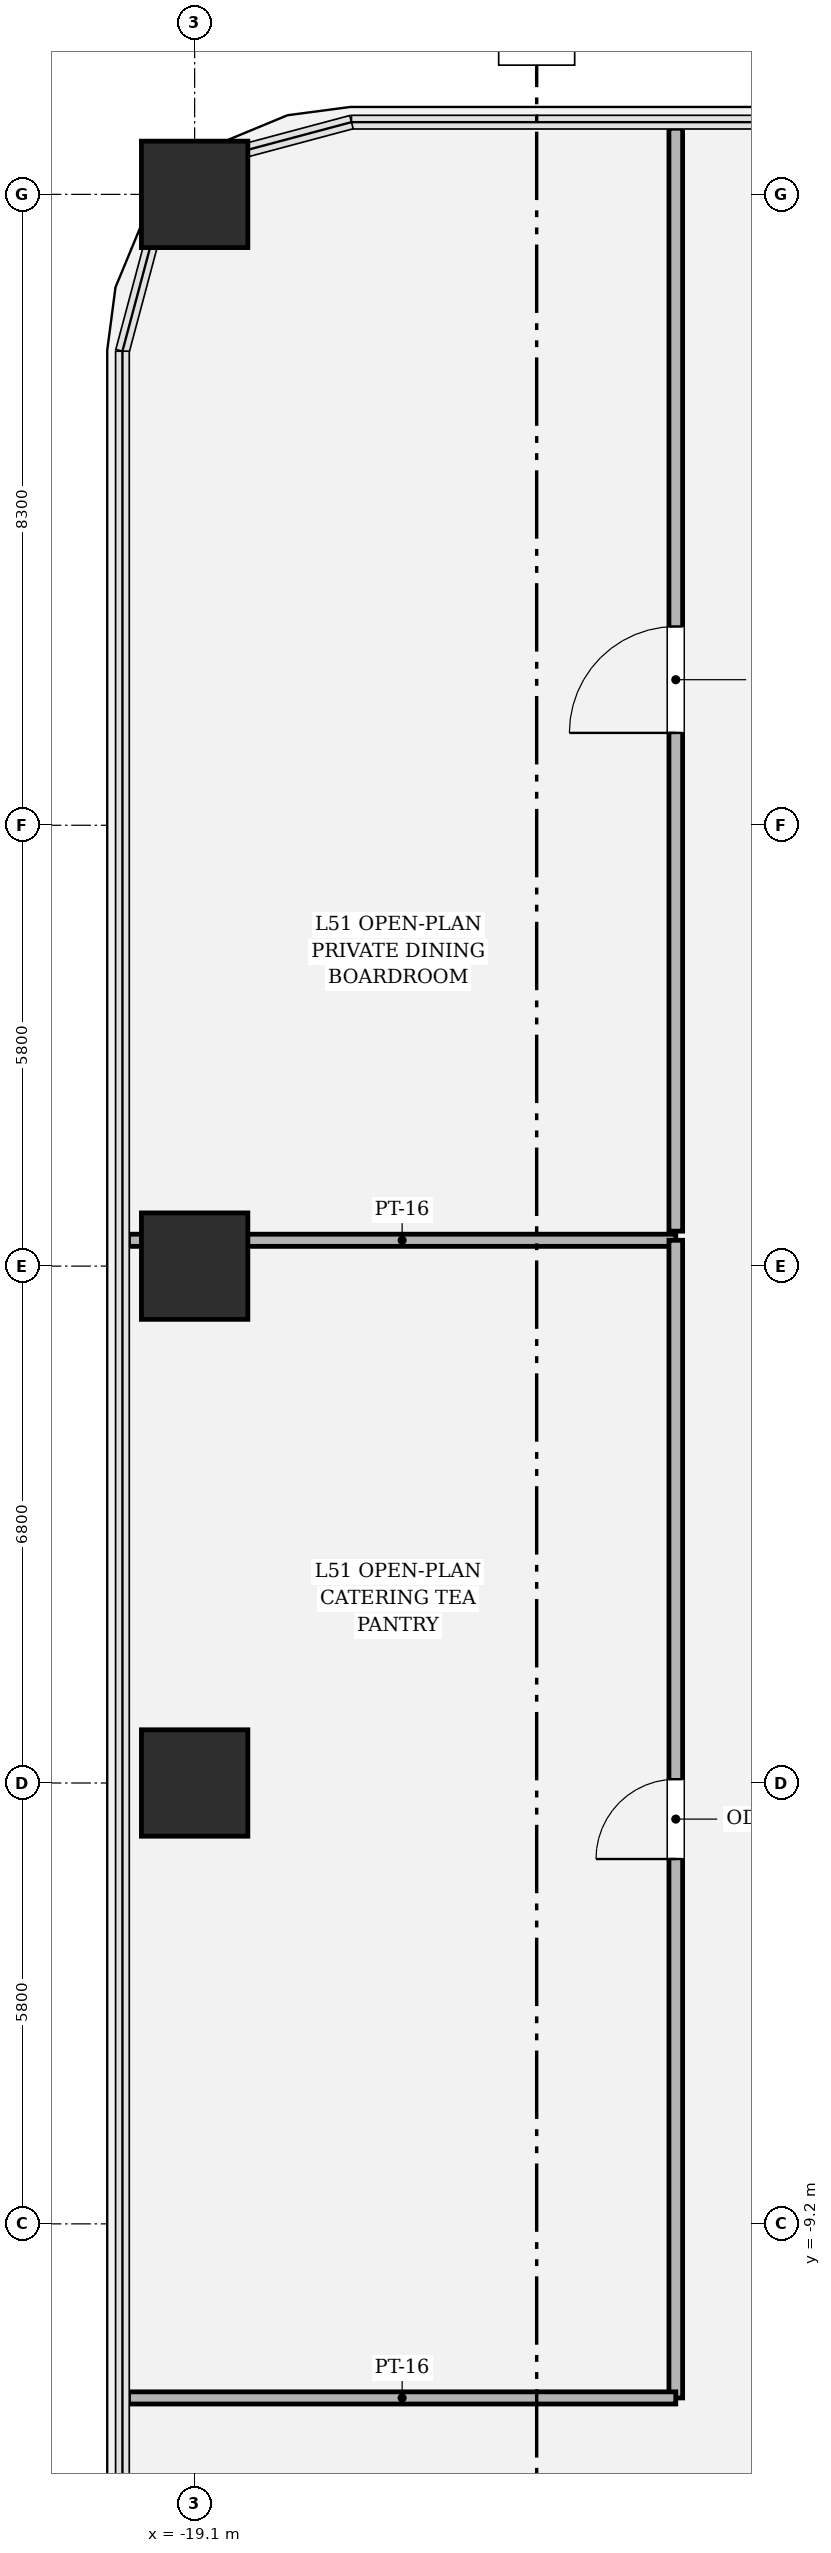
"""IFC4 building model, lengths in metres.
Left out: names, types, materials, properties, quantities, classifications, styles, units other than length and angle.
Written with IfcOpenShell. Run it as: python <this file> out.ifc"""

import sys

from ifc_helpers import new_model, si_unit, direction, frame, frame_2d, origin, origin_2d, place, context, subcontext, project, spatial, rectangle, hollow_rectangle, extrude, element, fill, save


model = new_model("IFC4")
c1 = context("Model", 3, precision=1e-05, world=origin(), true_north=direction((0.0, 1.0)))
c2 = subcontext(c1, "Body", "Model", "MODEL_VIEW")
j1 = project(units=[si_unit("LENGTHUNIT", "METRE"), si_unit("PLANEANGLEUNIT", "RADIAN")], contexts=[c1])
p1 = place(None, origin())
s1 = spatial("IfcSite", under=j1, at=p1, CompositionType="ELEMENT")
p2 = place(p1, origin())
s2 = spatial("IfcBuilding", under=s1, at=p2, CompositionType="ELEMENT")
p3 = place(p2, frame((0.0, 0.0, 216.75)))
s3 = spatial("IfcBuildingStorey", under=s2, at=p3, CompositionType="ELEMENT", Elevation=216.75)
for number, where, z_axis, x_axis in (
    (1, (-19.1, 17.5, 0.0), (0.0, 0.0, 1.0), (1.0, 0.0, 0.0)),
    (2, (-19.1, 3.4, 0.0), (0.0, 0.0, 1.0), (1.0, 0.0, 0.0)),
    (3, (-19.1, -3.4, 0.0), (0.0, 0.0, 1.0), (1.0, 0.0, 0.0)),
):
    element("IfcColumn", number, at=place(p3, frame(where, z_axis=z_axis, x_axis=x_axis)), inside=s3, PredefinedType="COLUMN", context=c2, shape_type="SweptSolid", body=[
        extrude(hollow_rectangle(XDim=1.4, YDim=1.4, WallThickness=0.042, at=origin_2d()), origin(), (0.0, 0.0, 1.0), 4.05),
    ])
p4 = place(p3, frame((-19.97, 3.74, 0.0), z_axis=(0.0, 0.0, 1.0), x_axis=(1.0, 0.0, 0.0)))
e4 = element("IfcWall", 4, at=p4, inside=s3, PredefinedType="PARTITIONING", context=c2, shape_type="SweptSolid", body=[
    extrude(rectangle(XDim=7.2, YDim=0.16, at=frame_2d((3.6, 0.0))), origin(), (0.0, 0.0, 1.0), 2.504),
])
p5 = place(p3, frame((-12.77, 3.74, 0.0), z_axis=(0.0, 0.0, 1.0), x_axis=(0.0, -1.0, 0.0)))
e5 = element("IfcWall", 5, at=p5, inside=s3, PredefinedType="PARTITIONING", context=c2, shape_type="SweptSolid", body=[
    extrude(rectangle(XDim=15.23, YDim=0.18, at=frame_2d((7.615, 0.0))), origin(), (0.0, 0.0, 1.0), 2.504),
])
p6 = place(p5, frame((7.09, 0.0, 0.0)))
e6 = element("IfcOpeningElement", 6, at=p6, cuts=e5, PredefinedType="OPENING", context=c2, shape_type="SweptSolid", body=[
    extrude(rectangle(XDim=1.05, YDim=2.2, at=frame_2d((0.525, 1.1))), frame((0.0, 0.1, 0.0), z_axis=(0.0, -1.0, 0.0), x_axis=(1.0, 0.0, 0.0)), (0.0, 0.0, 1.0), 0.2),
])
p7 = place(p3, frame((-12.77, -11.49, 0.0), z_axis=(0.0, 0.0, 1.0), x_axis=(-1.0, 0.0, 0.0)))
e7 = element("IfcWall", 7, at=p7, inside=s3, PredefinedType="PARTITIONING", context=c2, shape_type="SweptSolid", body=[
    extrude(rectangle(XDim=7.2, YDim=0.16, at=frame_2d((3.6, 0.0))), origin(), (0.0, 0.0, 1.0), 2.504),
])
p8 = place(p3, frame((-12.77, 18.37, 0.0), z_axis=(0.0, 0.0, 1.0), x_axis=(0.0, -1.0, 0.0)))
e8 = element("IfcWall", 8, at=p8, inside=s3, PredefinedType="PARTITIONING", context=c2, shape_type="SweptSolid", body=[
    extrude(rectangle(XDim=14.51, YDim=0.18, at=frame_2d((7.255, 0.0))), origin(), (0.0, 0.0, 1.0), 2.504),
])
p9 = place(p8, frame((6.555, 0.0, 0.0)))
e9 = element("IfcOpeningElement", 9, at=p9, cuts=e8, PredefinedType="OPENING", context=c2, shape_type="SweptSolid", body=[
    extrude(rectangle(XDim=1.4, YDim=2.25, at=frame_2d((0.7, 1.125))), frame((0.0, 0.1, 0.0), z_axis=(0.0, -1.0, 0.0), x_axis=(1.0, 0.0, 0.0)), (0.0, 0.0, 1.0), 0.2),
])
p10 = place(p6, origin())
e10 = element("IfcDoor", 10, at=p10, inside=s3, OperationType="SINGLE_SWING_RIGHT", PredefinedType="DOOR", context=c2, shape_type="SweptSolid", body=[
    extrude(rectangle(XDim=1.05, YDim=2.2, at=frame_2d((0.525, 1.1))), frame((0.0, 0.025, 0.0), z_axis=(0.0, -1.0, 0.0), x_axis=(1.0, 0.0, 0.0)), (0.0, 0.0, 1.0), 0.05),
])
fill(e6, e10)
p11 = place(p9, origin())
e11 = element("IfcDoor", 11, at=p11, inside=s3, OperationType="SINGLE_SWING_RIGHT", PredefinedType="DOOR", context=c2, shape_type="SweptSolid", body=[
    extrude(rectangle(XDim=1.4, YDim=2.25, at=frame_2d((0.7, 1.125))), frame((0.0, 0.025, 0.0), z_axis=(0.0, -1.0, 0.0), x_axis=(1.0, 0.0, 0.0)), (0.0, 0.0, 1.0), 0.05),
])
fill(e9, e11)
save(model, sys.argv[1])
